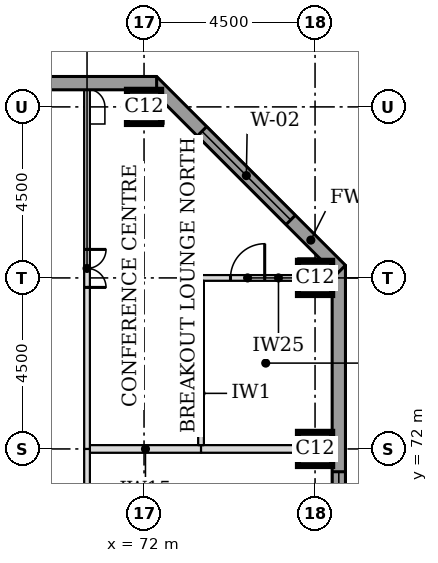
"""IFC4 building model, lengths in metres.
Left out: names, types, materials, properties, quantities, classifications, styles, units other than length and angle.
Written with IfcOpenShell. Run it as: python <this file> out.ifc"""

import sys

from ifc_helpers import new_model, si_unit, direction, frame, frame_2d, origin, origin_2d, place, context, subcontext, project, spatial, rectangle, extrude, element, fill, save


model = new_model("IFC4")
c1 = context("Model", 3, precision=1e-05, world=origin(), true_north=direction((0.0, 1.0)))
c2 = subcontext(c1, "Body", "Model", "MODEL_VIEW")
j1 = project(units=[si_unit("LENGTHUNIT", "METRE"), si_unit("PLANEANGLEUNIT", "RADIAN")], contexts=[c1])
p1 = place(None, origin())
s1 = spatial("IfcSite", under=j1, at=p1, CompositionType="ELEMENT")
p2 = place(p1, origin())
s2 = spatial("IfcBuilding", under=s1, at=p2, CompositionType="ELEMENT")
p3 = place(p2, frame((0.0, 0.0, 181.0)))
s3 = spatial("IfcBuildingStorey", under=s2, at=p3, CompositionType="ELEMENT", Elevation=181.0)
for number, where, z_axis, x_axis in (
    (1, (76.5, 72.0, 0.0), (0.0, 0.0, 1.0), (1.0, 0.0, 0.0)),
    (2, (76.5, 76.5, 0.0), (0.0, 0.0, 1.0), (1.0, 0.0, 0.0)),
    (3, (72.0, 81.0, 0.0), (0.0, 0.0, 1.0), (1.0, 0.0, 0.0)),
):
    element("IfcColumn", number, at=place(p3, frame(where, z_axis=z_axis, x_axis=x_axis)), inside=s3, PredefinedType="COLUMN", context=c2, shape_type="SweptSolid", body=[
        extrude(rectangle(XDim=0.9, YDim=0.9, at=origin_2d()), origin(), (0.0, 0.0, 1.0), 3.7),
    ])
p4 = place(p3, frame((77.125, 44.669, 0.0), z_axis=(0.0, 0.0, 1.0), x_axis=(0.0, 1.0, 0.0)))
e4 = element("IfcWall", 4, at=p4, inside=s3, PredefinedType="STANDARD", context=c2, shape_type="SweptSolid", body=[
    extrude(rectangle(XDim=32.163, YDim=0.35, at=frame_2d((16.081, 0.0))), origin(), (0.0, 0.0, 1.0), 3.525),
])
p5 = place(p4, frame((5.431, 0.0, 0.9)))
e5 = element("IfcOpeningElement", 5, at=p5, cuts=e4, PredefinedType="OPENING", context=c2, shape_type="SweptSolid", body=[
    extrude(rectangle(XDim=3.3, YDim=1.9, at=frame_2d((1.65, 0.95))), frame((0.0, 0.185, 0.0), z_axis=(0.0, -1.0, 0.0), x_axis=(1.0, 0.0, 0.0)), (0.0, 0.0, 1.0), 0.37),
])
p6 = place(p4, frame((9.931, 0.0, 0.9)))
e6 = element("IfcOpeningElement", 6, at=p6, cuts=e4, PredefinedType="OPENING", context=c2, shape_type="SweptSolid", body=[
    extrude(rectangle(XDim=3.3, YDim=1.9, at=frame_2d((1.65, 0.95))), frame((0.0, 0.185, 0.0), z_axis=(0.0, -1.0, 0.0), x_axis=(1.0, 0.0, 0.0)), (0.0, 0.0, 1.0), 0.37),
])
p7 = place(p4, frame((14.431, 0.0, 0.9)))
e7 = element("IfcOpeningElement", 7, at=p7, cuts=e4, PredefinedType="OPENING", context=c2, shape_type="SweptSolid", body=[
    extrude(rectangle(XDim=3.3, YDim=1.9, at=frame_2d((1.65, 0.95))), frame((0.0, 0.185, 0.0), z_axis=(0.0, -1.0, 0.0), x_axis=(1.0, 0.0, 0.0)), (0.0, 0.0, 1.0), 0.37),
])
p8 = place(p4, frame((18.931, 0.0, 0.9)))
e8 = element("IfcOpeningElement", 8, at=p8, cuts=e4, PredefinedType="OPENING", context=c2, shape_type="SweptSolid", body=[
    extrude(rectangle(XDim=3.3, YDim=1.9, at=frame_2d((1.65, 0.95))), frame((0.0, 0.185, 0.0), z_axis=(0.0, -1.0, 0.0), x_axis=(1.0, 0.0, 0.0)), (0.0, 0.0, 1.0), 0.37),
])
p9 = place(p4, frame((23.431, 0.0, 0.9)))
e9 = element("IfcOpeningElement", 9, at=p9, cuts=e4, PredefinedType="OPENING", context=c2, shape_type="SweptSolid", body=[
    extrude(rectangle(XDim=3.3, YDim=1.9, at=frame_2d((1.65, 0.95))), frame((0.0, 0.185, 0.0), z_axis=(0.0, -1.0, 0.0), x_axis=(1.0, 0.0, 0.0)), (0.0, 0.0, 1.0), 0.37),
])
p10 = place(p3, frame((77.176, 76.708, 0.0), z_axis=(0.0, 0.0, 1.0), x_axis=(-0.707106781187, 0.707106781187, 0.0)))
e10 = element("IfcWall", 10, at=p10, inside=s3, PredefinedType="STANDARD", context=c2, shape_type="SweptSolid", body=[
    extrude(rectangle(XDim=7.027, YDim=0.35, at=frame_2d((3.513, 0.0))), origin(), (0.0, 0.0, 1.0), 3.525),
])
p11 = place(p10, frame((1.863, 0.0, 0.9)))
e11 = element("IfcOpeningElement", 11, at=p11, cuts=e10, PredefinedType="OPENING", context=c2, shape_type="SweptSolid", body=[
    extrude(rectangle(XDim=3.3, YDim=1.9, at=frame_2d((1.65, 0.95))), frame((0.0, 0.185, 0.0), z_axis=(0.0, -1.0, 0.0), x_axis=(1.0, 0.0, 0.0)), (0.0, 0.0, 1.0), 0.37),
])
p12 = place(p3, frame((72.331, 81.625, 0.0), z_axis=(0.0, 0.0, 1.0), x_axis=(-1.0, 0.0, 0.0)))
e12 = element("IfcWall", 12, at=p12, inside=s3, PredefinedType="STANDARD", context=c2, shape_type="SweptSolid", body=[
    extrude(rectangle(XDim=32.163, YDim=0.35, at=frame_2d((16.081, 0.0))), origin(), (0.0, 0.0, 1.0), 3.525),
])
p13 = place(p12, frame((5.431, 0.0, 0.9)))
e13 = element("IfcOpeningElement", 13, at=p13, cuts=e12, PredefinedType="OPENING", context=c2, shape_type="SweptSolid", body=[
    extrude(rectangle(XDim=3.3, YDim=1.9, at=frame_2d((1.65, 0.95))), frame((0.0, 0.185, 0.0), z_axis=(0.0, -1.0, 0.0), x_axis=(1.0, 0.0, 0.0)), (0.0, 0.0, 1.0), 0.37),
])
p14 = place(p12, frame((9.931, 0.0, 0.9)))
e14 = element("IfcOpeningElement", 14, at=p14, cuts=e12, PredefinedType="OPENING", context=c2, shape_type="SweptSolid", body=[
    extrude(rectangle(XDim=3.3, YDim=1.9, at=frame_2d((1.65, 0.95))), frame((0.0, 0.185, 0.0), z_axis=(0.0, -1.0, 0.0), x_axis=(1.0, 0.0, 0.0)), (0.0, 0.0, 1.0), 0.37),
])
p15 = place(p12, frame((14.431, 0.0, 0.9)))
e15 = element("IfcOpeningElement", 15, at=p15, cuts=e12, PredefinedType="OPENING", context=c2, shape_type="SweptSolid", body=[
    extrude(rectangle(XDim=3.3, YDim=1.9, at=frame_2d((1.65, 0.95))), frame((0.0, 0.185, 0.0), z_axis=(0.0, -1.0, 0.0), x_axis=(1.0, 0.0, 0.0)), (0.0, 0.0, 1.0), 0.37),
])
p16 = place(p12, frame((18.931, 0.0, 0.9)))
e16 = element("IfcOpeningElement", 16, at=p16, cuts=e12, PredefinedType="OPENING", context=c2, shape_type="SweptSolid", body=[
    extrude(rectangle(XDim=3.3, YDim=1.9, at=frame_2d((1.65, 0.95))), frame((0.0, 0.185, 0.0), z_axis=(0.0, -1.0, 0.0), x_axis=(1.0, 0.0, 0.0)), (0.0, 0.0, 1.0), 0.37),
])
p17 = place(p12, frame((23.431, 0.0, 0.9)))
e17 = element("IfcOpeningElement", 17, at=p17, cuts=e12, PredefinedType="OPENING", context=c2, shape_type="SweptSolid", body=[
    extrude(rectangle(XDim=3.3, YDim=1.9, at=frame_2d((1.65, 0.95))), frame((0.0, 0.185, 0.0), z_axis=(0.0, -1.0, 0.0), x_axis=(1.0, 0.0, 0.0)), (0.0, 0.0, 1.0), 0.37),
])
p18 = place(p3, frame((70.575, 72.0, 0.0), z_axis=(0.0, 0.0, 1.0), x_axis=(1.0, 0.0, 0.0)))
e18 = element("IfcWall", 18, at=p18, inside=s3, PredefinedType="PARTITIONING", context=c2, shape_type="SweptSolid", body=[
    extrude(rectangle(XDim=2.925, YDim=0.2, at=frame_2d((1.462, 0.0))), origin(), (0.0, 0.0, 1.0), 3.55),
])
p19 = place(p3, frame((73.5, 72.0, 0.0), z_axis=(0.0, 0.0, 1.0), x_axis=(1.0, 0.0, 0.0)))
e19 = element("IfcWall", 19, at=p19, inside=s3, PredefinedType="PARTITIONING", context=c2, shape_type="SweptSolid", body=[
    extrude(rectangle(XDim=3.45, YDim=0.2, at=frame_2d((1.725, 0.0))), origin(), (0.0, 0.0, 1.0), 3.55),
])
p20 = place(p3, frame((73.425, 76.5, 0.0), z_axis=(0.0, 0.0, 1.0), x_axis=(1.0, 0.0, 0.0)))
e20 = element("IfcWall", 20, at=p20, inside=s3, PredefinedType="PARTITIONING", context=c2, shape_type="SweptSolid", body=[
    extrude(rectangle(XDim=2.625, YDim=0.15, at=frame_2d((1.312, 0.0))), origin(), (0.0, 0.0, 1.0), 3.096),
])
p21 = place(p20, frame((0.85, 0.0, 0.0)))
e21 = element("IfcOpeningElement", 21, at=p21, cuts=e20, PredefinedType="OPENING", context=c2, shape_type="SweptSolid", body=[
    extrude(rectangle(XDim=0.9, YDim=2.1, at=frame_2d((0.45, 1.05))), frame((0.0, 0.085, 0.0), z_axis=(0.0, -1.0, 0.0), x_axis=(1.0, 0.0, 0.0)), (0.0, 0.0, 1.0), 0.17),
])
p22 = place(p3, frame((70.5, 45.0, 0.0), z_axis=(0.0, 0.0, 1.0), x_axis=(0.0, 1.0, 0.0)))
e22 = element("IfcWall", 22, at=p22, inside=s3, PredefinedType="PARTITIONING", context=c2, shape_type="SweptSolid", body=[
    extrude(rectangle(XDim=27.0, YDim=0.15, at=frame_2d((13.5, 0.0))), origin(), (0.0, 0.0, 1.0), 3.55),
])
p23 = place(p22, frame((13.0, 0.0, 0.0)))
e23 = element("IfcOpeningElement", 23, at=p23, cuts=e22, PredefinedType="OPENING", context=c2, shape_type="SweptSolid", body=[
    extrude(rectangle(XDim=1.0, YDim=2.1, at=frame_2d((0.5, 1.05))), frame((0.0, 0.085, 0.0), z_axis=(0.0, -1.0, 0.0), x_axis=(1.0, 0.0, 0.0)), (0.0, 0.0, 1.0), 0.17),
])
p24 = place(p3, frame((70.5, 72.0, 0.0), z_axis=(0.0, 0.0, 1.0), x_axis=(0.0, 1.0, 0.0)))
e24 = element("IfcWall", 24, at=p24, inside=s3, PredefinedType="PARTITIONING", context=c2, shape_type="SweptSolid", body=[
    extrude(rectangle(XDim=9.45, YDim=0.15, at=frame_2d((4.725, 0.0))), origin(), (0.0, 0.0, 1.0), 3.55),
])
p25 = place(p24, frame((4.25, 0.0, 0.0)))
e25 = element("IfcOpeningElement", 25, at=p25, cuts=e24, PredefinedType="OPENING", context=c2, shape_type="SweptSolid", body=[
    extrude(rectangle(XDim=1.0, YDim=2.1, at=frame_2d((0.5, 1.05))), frame((0.0, 0.085, 0.0), z_axis=(0.0, -1.0, 0.0), x_axis=(1.0, 0.0, 0.0)), (0.0, 0.0, 1.0), 0.17),
])
p26 = place(p3, frame((73.5, 72.1, 0.0), z_axis=(0.0, 0.0, 1.0), x_axis=(0.0, 1.0, 0.0)))
e26 = element("IfcWall", 26, at=p26, inside=s3, PredefinedType="PARTITIONING", context=c2, shape_type="SweptSolid", body=[
    extrude(rectangle(XDim=4.325, YDim=0.15, at=frame_2d((2.163, 0.0))), origin(), (0.0, 0.0, 1.0), 3.55),
])
p27 = place(p9, origin())
e27 = element("IfcWindow", 27, at=p27, inside=s3, PartitioningType="SINGLE_PANEL", PredefinedType="WINDOW", context=c2, shape_type="SweptSolid", body=[
    extrude(rectangle(XDim=3.3, YDim=1.9, at=frame_2d((1.65, 0.95))), frame((0.0, 0.085, 0.0), z_axis=(0.0, -1.0, 0.0), x_axis=(1.0, 0.0, 0.0)), (0.0, 0.0, 1.0), 0.06),
])
fill(e9, e27)
p28 = place(p11, origin())
e28 = element("IfcWindow", 28, at=p28, inside=s3, PartitioningType="SINGLE_PANEL", PredefinedType="WINDOW", context=c2, shape_type="SweptSolid", body=[
    extrude(rectangle(XDim=3.3, YDim=1.9, at=frame_2d((1.65, 0.95))), frame((0.0, 0.085, 0.0), z_axis=(0.0, -1.0, 0.0), x_axis=(1.0, 0.0, 0.0)), (0.0, 0.0, 1.0), 0.06),
])
fill(e11, e28)
p29 = place(p25, frame((1.0, 0.0, 0.0), z_axis=(0.0, 0.0, 1.0), x_axis=(-1.0, 0.0, 0.0)))
e29 = element("IfcDoor", 29, at=p29, inside=s3, OperationType="DOUBLE_DOOR_SINGLE_SWING", PredefinedType="DOOR", context=c2, shape_type="SweptSolid", body=[
    extrude(rectangle(XDim=1.0, YDim=2.1, at=frame_2d((0.5, 1.05))), frame((0.0, 0.025, 0.0), z_axis=(0.0, -1.0, 0.0), x_axis=(1.0, 0.0, 0.0)), (0.0, 0.0, 1.0), 0.05),
])
fill(e25, e29)
p30 = place(p21, origin())
e30 = element("IfcDoor", 30, at=p30, inside=s3, OperationType="SINGLE_SWING_RIGHT", PredefinedType="DOOR", context=c2, shape_type="SweptSolid", body=[
    extrude(rectangle(XDim=0.9, YDim=2.1, at=frame_2d((0.45, 1.05))), frame((0.0, 0.025, 0.0), z_axis=(0.0, -1.0, 0.0), x_axis=(1.0, 0.0, 0.0)), (0.0, 0.0, 1.0), 0.05),
])
fill(e21, e30)
save(model, sys.argv[1])
